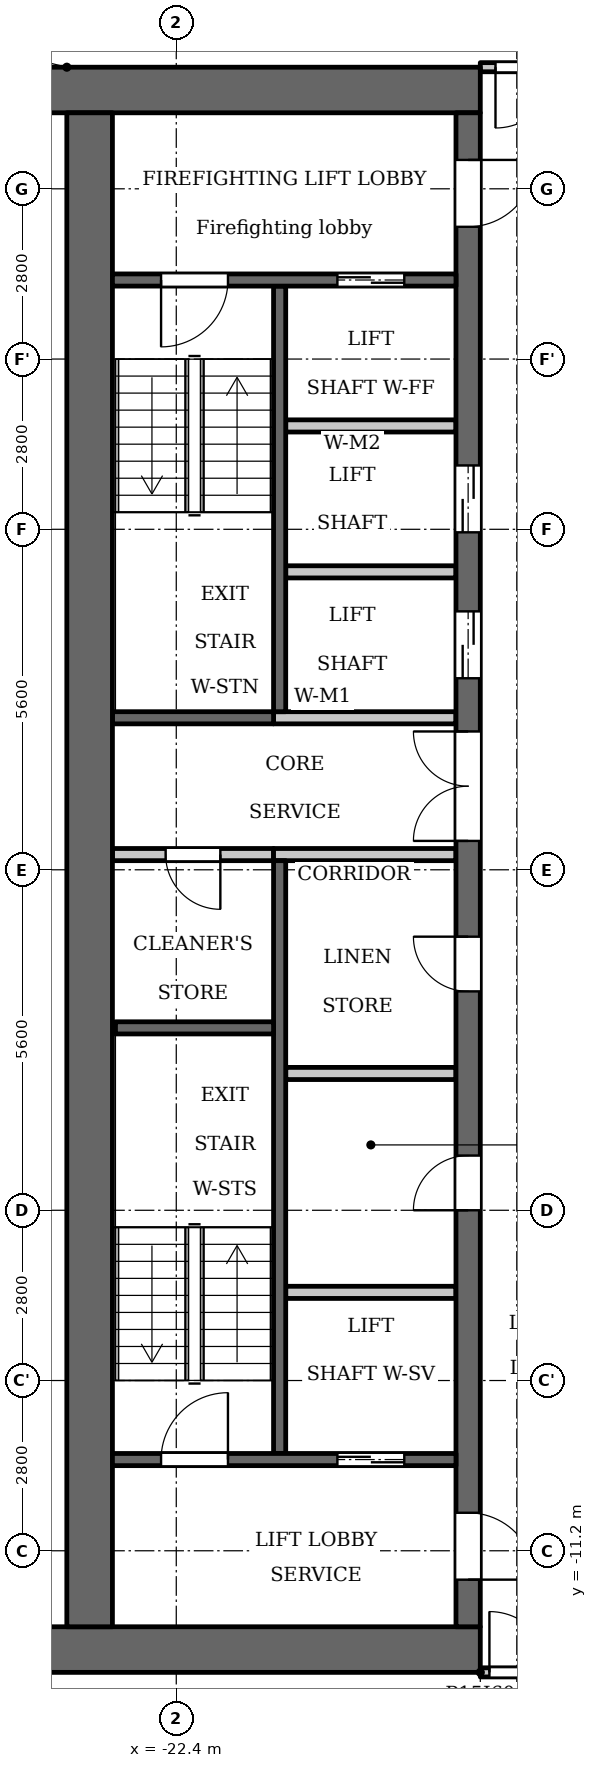
"""IFC4 building model, lengths in metres.
Left out: names, types, materials, properties, quantities, classifications, styles, units other than length and angle.
Written with IfcOpenShell. Run it as: python <this file> out.ifc"""

import sys

from ifc_helpers import new_model, si_unit, direction, frame, frame_2d, origin, place, context, subcontext, project, spatial, rectangle, extrude, element, fill, save


model = new_model("IFC4")
c1 = context("Model", 3, precision=1e-05, world=origin(), true_north=direction((0.0, 1.0)))
c2 = subcontext(c1, "Body", "Model", "MODEL_VIEW")
j1 = project(units=[si_unit("LENGTHUNIT", "METRE"), si_unit("PLANEANGLEUNIT", "RADIAN")], contexts=[c1])
p1 = place(None, origin())
s1 = spatial("IfcSite", under=j1, at=p1, CompositionType="ELEMENT")
p2 = place(p1, origin())
s2 = spatial("IfcBuilding", under=s1, at=p2, CompositionType="ELEMENT")
p3 = place(p2, frame((0.0, 0.0, 220.4)))
s3 = spatial("IfcBuildingStorey", under=s2, at=p3, CompositionType="ELEMENT", Elevation=220.4)
p4 = place(p3, frame((-20.7, 2.6, 0.0), z_axis=(0.0, 0.0, 1.0), x_axis=(0.0, 1.0, 0.0)))
e1 = element("IfcWall", 1, at=p4, inside=s3, PredefinedType="SHEAR", context=c2, shape_type="SweptSolid", body=[
    extrude(rectangle(XDim=7.0, YDim=0.2, at=frame_2d((3.5, 0.0))), origin(), (0.0, 0.0, 1.0), 3.2),
])
p5 = place(p3, frame((-20.7, -9.6, 0.0), z_axis=(0.0, 0.0, 1.0), x_axis=(0.0, 1.0, 0.0)))
e2 = element("IfcWall", 2, at=p5, inside=s3, PredefinedType="SHEAR", context=c2, shape_type="SweptSolid", body=[
    extrude(rectangle(XDim=9.75, YDim=0.2, at=frame_2d((4.875, 0.0))), origin(), (0.0, 0.0, 1.0), 3.2),
])
p6 = place(p3, frame((-20.8, 2.5, 0.0), z_axis=(0.0, 0.0, 1.0), x_axis=(-1.0, 0.0, 0.0)))
e3 = element("IfcWall", 3, at=p6, inside=s3, PredefinedType="SHEAR", context=c2, shape_type="SweptSolid", body=[
    extrude(rectangle(XDim=2.65, YDim=0.2, at=frame_2d((1.325, 0.0))), origin(), (0.0, 0.0, 1.0), 3.2),
])
p7 = place(p3, frame((-20.8, 0.25, 0.0), z_axis=(0.0, 0.0, 1.0), x_axis=(-1.0, 0.0, 0.0)))
e4 = element("IfcWall", 4, at=p7, inside=s3, PredefinedType="PARTITIONING", context=c2, shape_type="SweptSolid", body=[
    extrude(rectangle(XDim=2.65, YDim=0.2, at=frame_2d((1.325, 0.0))), origin(), (0.0, 0.0, 1.0), 3.2),
])
p8 = place(p7, frame((0.875, 0.0, 0.0)))
e5 = element("IfcOpeningElement", 5, at=p8, cuts=e4, PredefinedType="OPENING", context=c2, shape_type="SweptSolid", body=[
    extrude(rectangle(XDim=0.9, YDim=2.1, at=frame_2d((0.45, 1.05))), frame((0.0, 0.11, 0.0), z_axis=(0.0, -1.0, 0.0), x_axis=(1.0, 0.0, 0.0)), (0.0, 0.0, 1.0), 0.22),
])
for number, where, z_axis, x_axis in (
    (6, (-17.4, 12.825, 0.0), (0.0, 0.0, 1.0), (-1.0, 0.0, 0.0)),
    (7, (-17.4, -12.825, 0.0), (0.0, 0.0, 1.0), (-1.0, 0.0, 0.0)),
):
    element("IfcWall", number, at=place(p3, frame(where, z_axis=z_axis, x_axis=x_axis)), inside=s3, PredefinedType="SHEAR", context=c2, shape_type="SweptSolid", body=[
        extrude(rectangle(XDim=7.6, YDim=0.75, at=frame_2d((3.8, 0.0))), origin(), (0.0, 0.0, 1.0), 3.2),
    ])
p9 = place(p3, frame((-17.8, -3.35, 0.0), z_axis=(0.0, 0.0, 1.0), x_axis=(-1.0, 0.0, 0.0)))
e8 = element("IfcWall", 8, at=p9, inside=s3, PredefinedType="PARTITIONING", context=c2, shape_type="SweptSolid", body=[
    extrude(rectangle(XDim=2.8, YDim=0.2, at=frame_2d((1.4, 0.0))), origin(), (0.0, 0.0, 1.0), 3.2),
])
p10 = place(p3, frame((-17.6, -12.45, 0.0), z_axis=(0.0, 0.0, 1.0), x_axis=(0.0, 1.0, 0.0)))
e9 = element("IfcWall", 9, at=p10, inside=s3, PredefinedType="SHEAR", context=c2, shape_type="SweptSolid", body=[
    extrude(rectangle(XDim=24.9, YDim=0.4, at=frame_2d((12.45, 0.0))), origin(), (0.0, 0.0, 1.0), 3.2),
])
p11 = place(p10, frame((6.85, 0.0, 0.0)))
e10 = element("IfcOpeningElement", 10, at=p11, cuts=e9, PredefinedType="OPENING", context=c2, shape_type="SweptSolid", body=[
    extrude(rectangle(XDim=0.9, YDim=2.1, at=frame_2d((0.45, 1.05))), frame((0.0, 0.21, 0.0), z_axis=(0.0, -1.0, 0.0), x_axis=(1.0, 0.0, 0.0)), (0.0, 0.0, 1.0), 0.42),
])
p12 = place(p10, frame((10.45, 0.0, 0.0)))
e11 = element("IfcOpeningElement", 11, at=p12, cuts=e9, PredefinedType="OPENING", context=c2, shape_type="SweptSolid", body=[
    extrude(rectangle(XDim=0.9, YDim=2.1, at=frame_2d((0.45, 1.05))), frame((0.0, 0.21, 0.0), z_axis=(0.0, -1.0, 0.0), x_axis=(1.0, 0.0, 0.0)), (0.0, 0.0, 1.0), 0.42),
])
p13 = place(p10, frame((15.6, 0.0, 0.0)))
e12 = element("IfcOpeningElement", 12, at=p13, cuts=e9, PredefinedType="OPENING", context=c2, shape_type="SweptSolid", body=[
    extrude(rectangle(XDim=1.1, YDim=2.1, at=frame_2d((0.55, 1.05))), frame((0.0, 0.21, 0.0), z_axis=(0.0, -1.0, 0.0), x_axis=(1.0, 0.0, 0.0)), (0.0, 0.0, 1.0), 0.42),
])
p14 = place(p10, frame((18.0, 0.0, 0.0)))
e13 = element("IfcOpeningElement", 13, at=p14, cuts=e9, PredefinedType="OPENING", context=c2, shape_type="SweptSolid", body=[
    extrude(rectangle(XDim=1.1, YDim=2.1, at=frame_2d((0.55, 1.05))), frame((0.0, 0.21, 0.0), z_axis=(0.0, -1.0, 0.0), x_axis=(1.0, 0.0, 0.0)), (0.0, 0.0, 1.0), 0.42),
])
p15 = place(p10, frame((23.025, 0.0, 0.0)))
e14 = element("IfcOpeningElement", 14, at=p15, cuts=e9, PredefinedType="OPENING", context=c2, shape_type="SweptSolid", body=[
    extrude(rectangle(XDim=1.1, YDim=2.1, at=frame_2d((0.55, 1.05))), frame((0.0, 0.21, 0.0), z_axis=(0.0, -1.0, 0.0), x_axis=(1.0, 0.0, 0.0)), (0.0, 0.0, 1.0), 0.42),
])
p16 = place(p10, frame((0.775, 0.0, 0.0)))
e15 = element("IfcOpeningElement", 15, at=p16, cuts=e9, PredefinedType="OPENING", context=c2, shape_type="SweptSolid", body=[
    extrude(rectangle(XDim=1.1, YDim=2.1, at=frame_2d((0.55, 1.05))), frame((0.0, 0.21, 0.0), z_axis=(0.0, -1.0, 0.0), x_axis=(1.0, 0.0, 0.0)), (0.0, 0.0, 1.0), 0.42),
])
p17 = place(p10, frame((12.925, 0.0, 0.0)))
e16 = element("IfcOpeningElement", 16, at=p17, cuts=e9, PredefinedType="OPENING", context=c2, shape_type="SweptSolid", body=[
    extrude(rectangle(XDim=1.8, YDim=2.1, at=frame_2d((0.9, 1.05))), frame((0.0, 0.21, 0.0), z_axis=(0.0, -1.0, 0.0), x_axis=(1.0, 0.0, 0.0)), (0.0, 0.0, 1.0), 0.42),
])
p18 = place(p3, frame((-23.825, -12.45, 0.0), z_axis=(0.0, 0.0, 1.0), x_axis=(0.0, 1.0, 0.0)))
e17 = element("IfcWall", 17, at=p18, inside=s3, PredefinedType="SHEAR", context=c2, shape_type="SweptSolid", body=[
    extrude(rectangle(XDim=24.9, YDim=0.75, at=frame_2d((12.45, 0.0))), origin(), (0.0, 0.0, 1.0), 3.2),
])
p19 = place(p3, frame((-17.8, -9.7, 0.0), z_axis=(0.0, 0.0, 1.0), x_axis=(-1.0, 0.0, 0.0)))
e18 = element("IfcWall", 18, at=p19, inside=s3, PredefinedType="SHEAR", context=c2, shape_type="SweptSolid", body=[
    extrude(rectangle(XDim=5.65, YDim=0.2, at=frame_2d((2.825, 0.0))), origin(), (0.0, 0.0, 1.0), 3.2),
])
p20 = place(p19, frame((0.85, 0.0, 0.0)))
e19 = element("IfcOpeningElement", 19, at=p20, cuts=e18, PredefinedType="OPENING", context=c2, shape_type="SweptSolid", body=[
    extrude(rectangle(XDim=1.1, YDim=2.1, at=frame_2d((0.55, 1.05))), frame((0.0, 0.11, 0.0), z_axis=(0.0, -1.0, 0.0), x_axis=(1.0, 0.0, 0.0)), (0.0, 0.0, 1.0), 0.22),
])
p21 = place(p19, frame((3.75, 0.0, 0.0)))
e20 = element("IfcOpeningElement", 20, at=p21, cuts=e18, PredefinedType="OPENING", context=c2, shape_type="SweptSolid", body=[
    extrude(rectangle(XDim=1.1, YDim=2.1, at=frame_2d((0.55, 1.05))), frame((0.0, 0.11, 0.0), z_axis=(0.0, -1.0, 0.0), x_axis=(1.0, 0.0, 0.0)), (0.0, 0.0, 1.0), 0.22),
])
p22 = place(p3, frame((-17.8, -6.95, 0.0), z_axis=(0.0, 0.0, 1.0), x_axis=(-1.0, 0.0, 0.0)))
e21 = element("IfcWall", 21, at=p22, inside=s3, PredefinedType="PARTITIONING", context=c2, shape_type="SweptSolid", body=[
    extrude(rectangle(XDim=2.8, YDim=0.2, at=frame_2d((1.4, 0.0))), origin(), (0.0, 0.0, 1.0), 3.2),
])
for number, where, z_axis, x_axis in (
    (22, (-17.8, 0.25, 0.0), (0.0, 0.0, 1.0), (-1.0, 0.0, 0.0)),
    (23, (-17.8, 2.5, 0.0), (0.0, 0.0, 1.0), (-1.0, 0.0, 0.0)),
):
    element("IfcWall", number, at=place(p3, frame(where, z_axis=z_axis, x_axis=x_axis)), inside=s3, PredefinedType="PARTITIONING", context=c2, shape_type="SweptSolid", body=[
        extrude(rectangle(XDim=3.0, YDim=0.2, at=frame_2d((1.5, 0.0))), origin(), (0.0, 0.0, 1.0), 3.2),
    ])
for number, where, z_axis, x_axis in (
    (24, (-17.8, 4.9, 0.0), (0.0, 0.0, 1.0), (-1.0, 0.0, 0.0)),
    (25, (-17.8, 7.3, 0.0), (0.0, 0.0, 1.0), (-1.0, 0.0, 0.0)),
):
    element("IfcWall", number, at=place(p3, frame(where, z_axis=z_axis, x_axis=x_axis)), inside=s3, PredefinedType="PARTITIONING", context=c2, shape_type="SweptSolid", body=[
        extrude(rectangle(XDim=2.8, YDim=0.2, at=frame_2d((1.4, 0.0))), origin(), (0.0, 0.0, 1.0), 3.2),
    ])
p23 = place(p3, frame((-17.8, 9.7, 0.0), z_axis=(0.0, 0.0, 1.0), x_axis=(-1.0, 0.0, 0.0)))
e26 = element("IfcWall", 26, at=p23, inside=s3, PredefinedType="SHEAR", context=c2, shape_type="SweptSolid", body=[
    extrude(rectangle(XDim=5.65, YDim=0.2, at=frame_2d((2.825, 0.0))), origin(), (0.0, 0.0, 1.0), 3.2),
])
p24 = place(p23, frame((0.85, 0.0, 0.0)))
e27 = element("IfcOpeningElement", 27, at=p24, cuts=e26, PredefinedType="OPENING", context=c2, shape_type="SweptSolid", body=[
    extrude(rectangle(XDim=1.1, YDim=2.1, at=frame_2d((0.55, 1.05))), frame((0.0, 0.11, 0.0), z_axis=(0.0, -1.0, 0.0), x_axis=(1.0, 0.0, 0.0)), (0.0, 0.0, 1.0), 0.22),
])
p25 = place(p23, frame((3.75, 0.0, 0.0)))
e28 = element("IfcOpeningElement", 28, at=p25, cuts=e26, PredefinedType="OPENING", context=c2, shape_type="SweptSolid", body=[
    extrude(rectangle(XDim=1.1, YDim=2.1, at=frame_2d((0.55, 1.05))), frame((0.0, 0.11, 0.0), z_axis=(0.0, -1.0, 0.0), x_axis=(1.0, 0.0, 0.0)), (0.0, 0.0, 1.0), 0.22),
])
p26 = place(p3, frame((-20.8, -2.6, 0.0), z_axis=(0.0, 0.0, 1.0), x_axis=(-1.0, 0.0, 0.0)))
e29 = element("IfcWall", 29, at=p26, inside=s3, PredefinedType="SHEAR", context=c2, shape_type="SweptSolid", body=[
    extrude(rectangle(XDim=2.6, YDim=0.2, at=frame_2d((1.3, 0.0))), origin(), (0.0, 0.0, 1.0), 3.2),
])
p27 = place(p3, frame((-17.4, -13.2, 0.0), z_axis=(0.0, 0.0, 1.0), x_axis=(1.0, 0.0, 0.0)))
e30 = element("IfcWall", 30, at=p27, inside=s3, PredefinedType="PARTITIONING", context=c2, shape_type="SweptSolid", body=[
    extrude(rectangle(XDim=34.8, YDim=0.15, at=frame_2d((17.4, 0.0))), origin(), (0.0, 0.0, 1.0), 3.2),
])
p28 = place(p27, frame((0.15, 0.0, 0.0)))
e31 = element("IfcOpeningElement", 31, at=p28, cuts=e30, PredefinedType="OPENING", context=c2, shape_type="SweptSolid", body=[
    extrude(rectangle(XDim=1.0, YDim=2.1, at=frame_2d((0.5, 1.05))), frame((0.0, 0.085, 0.0), z_axis=(0.0, -1.0, 0.0), x_axis=(1.0, 0.0, 0.0)), (0.0, 0.0, 1.0), 0.17),
])
p29 = place(p27, frame((33.55, 0.0, 0.0)))
e32 = element("IfcOpeningElement", 32, at=p29, cuts=e30, PredefinedType="OPENING", context=c2, shape_type="SweptSolid", body=[
    extrude(rectangle(XDim=1.0, YDim=2.1, at=frame_2d((0.5, 1.05))), frame((0.0, 0.085, 0.0), z_axis=(0.0, -1.0, 0.0), x_axis=(1.0, 0.0, 0.0)), (0.0, 0.0, 1.0), 0.17),
])
p30 = place(p27, frame((3.7, 0.0, 0.0)))
e33 = element("IfcOpeningElement", 33, at=p30, cuts=e30, PredefinedType="OPENING", context=c2, shape_type="SweptSolid", body=[
    extrude(rectangle(XDim=1.0, YDim=2.1, at=frame_2d((0.5, 1.05))), frame((0.0, 0.085, 0.0), z_axis=(0.0, -1.0, 0.0), x_axis=(1.0, 0.0, 0.0)), (0.0, 0.0, 1.0), 0.17),
])
p31 = place(p27, frame((15.7, 0.0, 0.0)))
e34 = element("IfcOpeningElement", 34, at=p31, cuts=e30, PredefinedType="OPENING", context=c2, shape_type="SweptSolid", body=[
    extrude(rectangle(XDim=1.0, YDim=2.1, at=frame_2d((0.5, 1.05))), frame((0.0, 0.085, 0.0), z_axis=(0.0, -1.0, 0.0), x_axis=(1.0, 0.0, 0.0)), (0.0, 0.0, 1.0), 0.17),
])
p32 = place(p27, frame((21.3, 0.0, 0.0)))
e35 = element("IfcOpeningElement", 35, at=p32, cuts=e30, PredefinedType="OPENING", context=c2, shape_type="SweptSolid", body=[
    extrude(rectangle(XDim=1.0, YDim=2.1, at=frame_2d((0.5, 1.05))), frame((0.0, 0.085, 0.0), z_axis=(0.0, -1.0, 0.0), x_axis=(1.0, 0.0, 0.0)), (0.0, 0.0, 1.0), 0.17),
])
p33 = place(p27, frame((29.5, 0.0, 0.0)))
e36 = element("IfcOpeningElement", 36, at=p33, cuts=e30, PredefinedType="OPENING", context=c2, shape_type="SweptSolid", body=[
    extrude(rectangle(XDim=1.0, YDim=2.1, at=frame_2d((0.5, 1.05))), frame((0.0, 0.085, 0.0), z_axis=(0.0, -1.0, 0.0), x_axis=(1.0, 0.0, 0.0)), (0.0, 0.0, 1.0), 0.17),
])
p34 = place(p3, frame((-17.4, 13.2, 0.0), z_axis=(0.0, 0.0, 1.0), x_axis=(1.0, 0.0, 0.0)))
e37 = element("IfcWall", 37, at=p34, inside=s3, PredefinedType="PARTITIONING", context=c2, shape_type="SweptSolid", body=[
    extrude(rectangle(XDim=34.8, YDim=0.15, at=frame_2d((17.4, 0.0))), origin(), (0.0, 0.0, 1.0), 3.2),
])
p35 = place(p34, frame((0.25, 0.0, 0.0)))
e38 = element("IfcOpeningElement", 38, at=p35, cuts=e37, PredefinedType="OPENING", context=c2, shape_type="SweptSolid", body=[
    extrude(rectangle(XDim=1.0, YDim=2.1, at=frame_2d((0.5, 1.05))), frame((0.0, 0.085, 0.0), z_axis=(0.0, -1.0, 0.0), x_axis=(1.0, 0.0, 0.0)), (0.0, 0.0, 1.0), 0.17),
])
p36 = place(p34, frame((33.65, 0.0, 0.0)))
e39 = element("IfcOpeningElement", 39, at=p36, cuts=e37, PredefinedType="OPENING", context=c2, shape_type="SweptSolid", body=[
    extrude(rectangle(XDim=1.0, YDim=2.1, at=frame_2d((0.5, 1.05))), frame((0.0, 0.085, 0.0), z_axis=(0.0, -1.0, 0.0), x_axis=(1.0, 0.0, 0.0)), (0.0, 0.0, 1.0), 0.17),
])
p37 = place(p34, frame((15.75, 0.0, 0.0)))
e40 = element("IfcOpeningElement", 40, at=p37, cuts=e37, PredefinedType="OPENING", context=c2, shape_type="SweptSolid", body=[
    extrude(rectangle(XDim=1.0, YDim=2.1, at=frame_2d((0.5, 1.05))), frame((0.0, 0.085, 0.0), z_axis=(0.0, -1.0, 0.0), x_axis=(1.0, 0.0, 0.0)), (0.0, 0.0, 1.0), 0.17),
])
p38 = place(p34, frame((26.95, 0.0, 0.0)))
e41 = element("IfcOpeningElement", 41, at=p38, cuts=e37, PredefinedType="OPENING", context=c2, shape_type="SweptSolid", body=[
    extrude(rectangle(XDim=1.0, YDim=2.1, at=frame_2d((0.5, 1.05))), frame((0.0, 0.085, 0.0), z_axis=(0.0, -1.0, 0.0), x_axis=(1.0, 0.0, 0.0)), (0.0, 0.0, 1.0), 0.17),
])
p39 = place(p34, frame((29.75, 0.0, 0.0)))
e42 = element("IfcOpeningElement", 42, at=p39, cuts=e37, PredefinedType="OPENING", context=c2, shape_type="SweptSolid", body=[
    extrude(rectangle(XDim=1.0, YDim=2.1, at=frame_2d((0.5, 1.05))), frame((0.0, 0.085, 0.0), z_axis=(0.0, -1.0, 0.0), x_axis=(1.0, 0.0, 0.0)), (0.0, 0.0, 1.0), 0.17),
])
p40 = place(p20, origin())
e43 = element("IfcDoor", 43, at=p40, inside=s3, OperationType="DOUBLE_DOOR_SLIDING", PredefinedType="DOOR", context=c2, shape_type="SweptSolid", body=[
    extrude(rectangle(XDim=1.1, YDim=2.1, at=frame_2d((0.55, 1.05))), frame((0.0, 0.025, 0.0), z_axis=(0.0, -1.0, 0.0), x_axis=(1.0, 0.0, 0.0)), (0.0, 0.0, 1.0), 0.05),
])
fill(e19, e43)
p41 = place(p11, origin())
e44 = element("IfcDoor", 44, at=p41, inside=s3, OperationType="SINGLE_SWING_RIGHT", PredefinedType="DOOR", context=c2, shape_type="SweptSolid", body=[
    extrude(rectangle(XDim=0.9, YDim=2.1, at=frame_2d((0.45, 1.05))), frame((0.0, 0.025, 0.0), z_axis=(0.0, -1.0, 0.0), x_axis=(1.0, 0.0, 0.0)), (0.0, 0.0, 1.0), 0.05),
])
fill(e10, e44)
p42 = place(p12, origin())
e45 = element("IfcDoor", 45, at=p42, inside=s3, OperationType="SINGLE_SWING_LEFT", PredefinedType="DOOR", context=c2, shape_type="SweptSolid", body=[
    extrude(rectangle(XDim=0.9, YDim=2.1, at=frame_2d((0.45, 1.05))), frame((0.0, 0.025, 0.0), z_axis=(0.0, -1.0, 0.0), x_axis=(1.0, 0.0, 0.0)), (0.0, 0.0, 1.0), 0.05),
])
fill(e11, e45)
p43 = place(p13, origin())
e46 = element("IfcDoor", 46, at=p43, inside=s3, OperationType="DOUBLE_DOOR_SLIDING", PredefinedType="DOOR", context=c2, shape_type="SweptSolid", body=[
    extrude(rectangle(XDim=1.1, YDim=2.1, at=frame_2d((0.55, 1.05))), frame((0.0, 0.025, 0.0), z_axis=(0.0, -1.0, 0.0), x_axis=(1.0, 0.0, 0.0)), (0.0, 0.0, 1.0), 0.05),
])
fill(e12, e46)
p44 = place(p14, origin())
e47 = element("IfcDoor", 47, at=p44, inside=s3, OperationType="DOUBLE_DOOR_SLIDING", PredefinedType="DOOR", context=c2, shape_type="SweptSolid", body=[
    extrude(rectangle(XDim=1.1, YDim=2.1, at=frame_2d((0.55, 1.05))), frame((0.0, 0.025, 0.0), z_axis=(0.0, -1.0, 0.0), x_axis=(1.0, 0.0, 0.0)), (0.0, 0.0, 1.0), 0.05),
])
fill(e13, e47)
p45 = place(p24, origin())
e48 = element("IfcDoor", 48, at=p45, inside=s3, OperationType="DOUBLE_DOOR_SLIDING", PredefinedType="DOOR", context=c2, shape_type="SweptSolid", body=[
    extrude(rectangle(XDim=1.1, YDim=2.1, at=frame_2d((0.55, 1.05))), frame((0.0, 0.025, 0.0), z_axis=(0.0, -1.0, 0.0), x_axis=(1.0, 0.0, 0.0)), (0.0, 0.0, 1.0), 0.05),
])
fill(e27, e48)
p46 = place(p15, origin())
e49 = element("IfcDoor", 49, at=p46, inside=s3, OperationType="SINGLE_SWING_RIGHT", PredefinedType="DOOR", context=c2, shape_type="SweptSolid", body=[
    extrude(rectangle(XDim=1.1, YDim=2.1, at=frame_2d((0.55, 1.05))), frame((0.0, 0.025, 0.0), z_axis=(0.0, -1.0, 0.0), x_axis=(1.0, 0.0, 0.0)), (0.0, 0.0, 1.0), 0.05),
])
fill(e14, e49)
p47 = place(p16, origin())
e50 = element("IfcDoor", 50, at=p47, inside=s3, OperationType="SINGLE_SWING_LEFT", PredefinedType="DOOR", context=c2, shape_type="SweptSolid", body=[
    extrude(rectangle(XDim=1.1, YDim=2.1, at=frame_2d((0.55, 1.05))), frame((0.0, 0.025, 0.0), z_axis=(0.0, -1.0, 0.0), x_axis=(1.0, 0.0, 0.0)), (0.0, 0.0, 1.0), 0.05),
])
fill(e15, e50)
p48 = place(p25, origin())
e51 = element("IfcDoor", 51, at=p48, inside=s3, OperationType="SINGLE_SWING_LEFT", PredefinedType="DOOR", context=c2, shape_type="SweptSolid", body=[
    extrude(rectangle(XDim=1.1, YDim=2.1, at=frame_2d((0.55, 1.05))), frame((0.0, 0.025, 0.0), z_axis=(0.0, -1.0, 0.0), x_axis=(1.0, 0.0, 0.0)), (0.0, 0.0, 1.0), 0.05),
])
fill(e28, e51)
p49 = place(p21, origin())
e52 = element("IfcDoor", 52, at=p49, inside=s3, OperationType="SINGLE_SWING_LEFT", PredefinedType="DOOR", context=c2, shape_type="SweptSolid", body=[
    extrude(rectangle(XDim=1.1, YDim=2.1, at=frame_2d((0.55, 1.05))), frame((0.0, 0.025, 0.0), z_axis=(0.0, -1.0, 0.0), x_axis=(1.0, 0.0, 0.0)), (0.0, 0.0, 1.0), 0.05),
])
fill(e20, e52)
p50 = place(p17, origin())
e53 = element("IfcDoor", 53, at=p50, inside=s3, OperationType="DOUBLE_DOOR_SINGLE_SWING", PredefinedType="DOOR", context=c2, shape_type="SweptSolid", body=[
    extrude(rectangle(XDim=1.8, YDim=2.1, at=frame_2d((0.9, 1.05))), frame((0.0, 0.025, 0.0), z_axis=(0.0, -1.0, 0.0), x_axis=(1.0, 0.0, 0.0)), (0.0, 0.0, 1.0), 0.05),
])
fill(e16, e53)
p51 = place(p8, origin())
e54 = element("IfcDoor", 54, at=p51, inside=s3, OperationType="SINGLE_SWING_RIGHT", PredefinedType="DOOR", context=c2, shape_type="SweptSolid", body=[
    extrude(rectangle(XDim=0.9, YDim=2.1, at=frame_2d((0.45, 1.05))), frame((0.0, 0.025, 0.0), z_axis=(0.0, -1.0, 0.0), x_axis=(1.0, 0.0, 0.0)), (0.0, 0.0, 1.0), 0.05),
])
fill(e5, e54)
p52 = place(p35, origin())
e55 = element("IfcDoor", 55, at=p52, inside=s3, OperationType="SINGLE_SWING_LEFT", PredefinedType="DOOR", context=c2, shape_type="SweptSolid", body=[
    extrude(rectangle(XDim=1.0, YDim=2.1, at=frame_2d((0.5, 1.05))), frame((0.0, 0.025, 0.0), z_axis=(0.0, -1.0, 0.0), x_axis=(1.0, 0.0, 0.0)), (0.0, 0.0, 1.0), 0.05),
])
fill(e38, e55)
p53 = place(p28, origin())
e56 = element("IfcDoor", 56, at=p53, inside=s3, OperationType="SINGLE_SWING_RIGHT", PredefinedType="DOOR", context=c2, shape_type="SweptSolid", body=[
    extrude(rectangle(XDim=1.0, YDim=2.1, at=frame_2d((0.5, 1.05))), frame((0.0, 0.025, 0.0), z_axis=(0.0, -1.0, 0.0), x_axis=(1.0, 0.0, 0.0)), (0.0, 0.0, 1.0), 0.05),
])
fill(e31, e56)
save(model, sys.argv[1])
